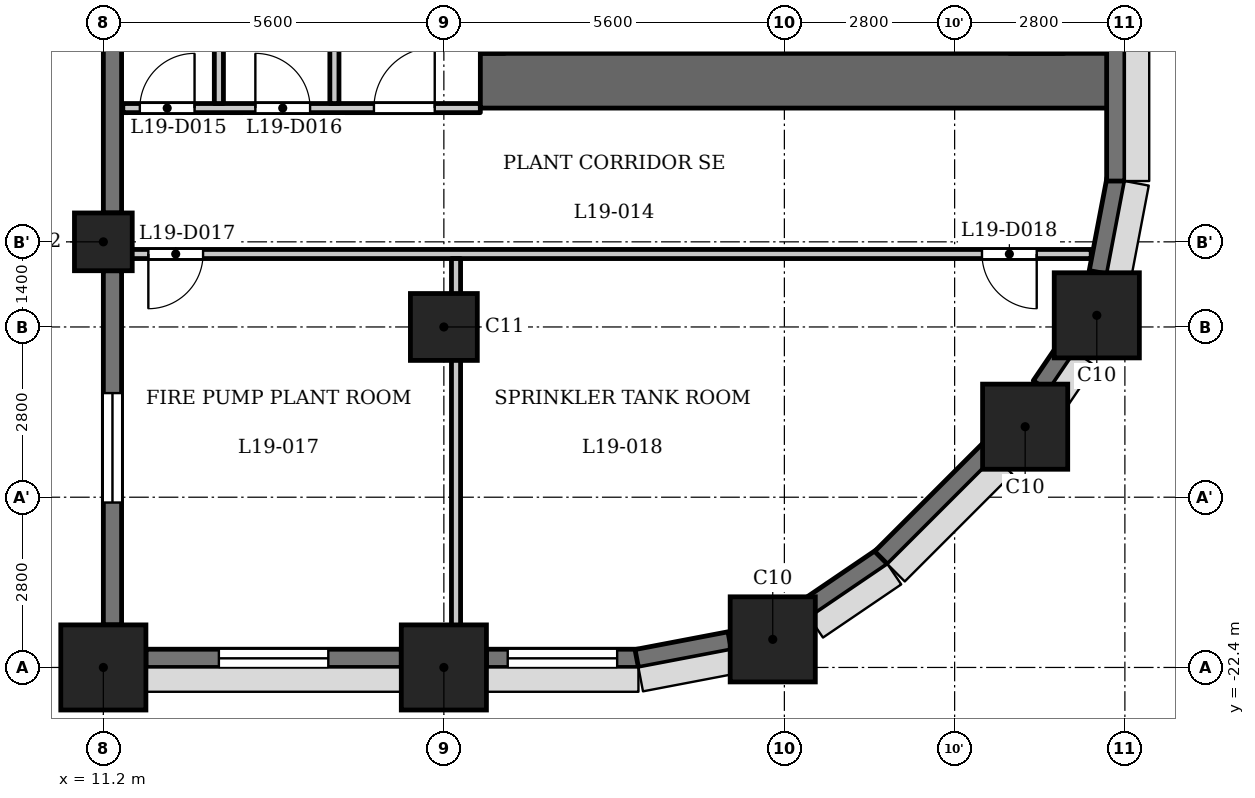
"""IFC4 building model, lengths in metres.
Left out: names, types, materials, properties, quantities, classifications, styles, units other than length and angle.
Written with IfcOpenShell. Run it as: python <this file> out.ifc"""

import sys

from ifc_helpers import new_model, si_unit, direction, frame, frame_2d, origin, origin_2d, place, context, subcontext, project, spatial, rectangle, extrude, element, fill, save


model = new_model("IFC4")
c1 = context("Model", 3, precision=1e-05, world=origin(), true_north=direction((0.0, 1.0)))
c2 = subcontext(c1, "Body", "Model", "MODEL_VIEW")
j1 = project(units=[si_unit("LENGTHUNIT", "METRE"), si_unit("PLANEANGLEUNIT", "RADIAN")], contexts=[c1])
p1 = place(None, origin())
s1 = spatial("IfcSite", under=j1, at=p1, CompositionType="ELEMENT")
p2 = place(p1, origin())
s2 = spatial("IfcBuilding", under=s1, at=p2, CompositionType="ELEMENT")
p3 = place(p2, frame((0.0, 0.0, 77.9)))
s3 = spatial("IfcBuildingStorey", under=s2, at=p3, CompositionType="ELEMENT", Elevation=77.9)
for number, where, z_axis, x_axis in (
    (1, (11.2, -22.4, 0.0), (0.0, 0.0, 1.0), (1.0, 0.0, 0.0)),
    (2, (16.8, -22.4, 0.0), (0.0, 0.0, 1.0), (1.0, 0.0, 0.0)),
    (3, (22.209, -21.938, 0.0), (0.0, 0.0, 1.0), (1.0, 0.0, 0.0)),
    (4, (26.36, -18.44, 0.0), (0.0, 0.0, 1.0), (1.0, 0.0, 0.0)),
    (5, (27.538, -16.609, 0.0), (0.0, 0.0, 1.0), (1.0, 0.0, 0.0)),
):
    element("IfcColumn", number, at=place(p3, frame(where, z_axis=z_axis, x_axis=x_axis)), inside=s3, PredefinedType="COLUMN", context=c2, shape_type="SweptSolid", body=[
        extrude(rectangle(XDim=1.4, YDim=1.4, at=origin_2d()), origin(), (0.0, 0.0, 1.0), 5.4),
    ])
p4 = place(p3, frame((16.8, -16.8, 0.0), z_axis=(0.0, 0.0, 1.0), x_axis=(1.0, 0.0, 0.0)))
e6 = element("IfcColumn", 6, at=p4, inside=s3, PredefinedType="COLUMN", context=c2, shape_type="SweptSolid", body=[
    extrude(rectangle(XDim=1.1, YDim=1.1, at=origin_2d()), origin(), (0.0, 0.0, 1.0), 5.4),
])
p5 = place(p3, frame((11.2, -15.4, 0.0), z_axis=(0.0, 0.0, 1.0), x_axis=(1.0, 0.0, 0.0)))
e7 = element("IfcColumn", 7, at=p5, inside=s3, PredefinedType="COLUMN", context=c2, shape_type="SweptSolid", body=[
    extrude(rectangle(XDim=0.95, YDim=0.95, at=origin_2d()), origin(), (0.0, 0.0, 1.0), 5.4),
])
p6 = place(p3, frame((11.35, -8.95, 0.0), z_axis=(0.0, 0.0, 1.0), x_axis=(0.0, -1.0, 0.0)))
e8 = element("IfcWall", 8, at=p6, inside=s3, PredefinedType="SOLIDWALL", context=c2, shape_type="SweptSolid", body=[
    extrude(rectangle(XDim=5.975, YDim=0.3, at=frame_2d((2.988, 0.0))), origin(), (0.0, 0.0, 1.0), 5.1),
])
p7 = place(p6, frame((1.188, 0.0, 0.9)))
e9 = element("IfcOpeningElement", 9, at=p7, cuts=e8, PredefinedType="OPENING", context=c2, shape_type="SweptSolid", body=[
    extrude(rectangle(XDim=1.8, YDim=1.5, at=frame_2d((0.9, 0.75))), frame((0.0, 0.16, 0.0), z_axis=(0.0, -1.0, 0.0), x_axis=(1.0, 0.0, 0.0)), (0.0, 0.0, 1.0), 0.32),
])
p8 = place(p3, frame((11.35, -15.875, 0.0), z_axis=(0.0, 0.0, 1.0), x_axis=(0.0, -1.0, 0.0)))
e10 = element("IfcWall", 10, at=p8, inside=s3, PredefinedType="SOLIDWALL", context=c2, shape_type="SweptSolid", body=[
    extrude(rectangle(XDim=5.825, YDim=0.3, at=frame_2d((2.913, 0.0))), origin(), (0.0, 0.0, 1.0), 5.1),
])
p9 = place(p8, frame((2.012, 0.0, 0.9)))
e11 = element("IfcOpeningElement", 11, at=p9, cuts=e10, PredefinedType="OPENING", context=c2, shape_type="SweptSolid", body=[
    extrude(rectangle(XDim=1.8, YDim=1.5, at=frame_2d((0.9, 0.75))), frame((0.0, 0.16, 0.0), z_axis=(0.0, -1.0, 0.0), x_axis=(1.0, 0.0, 0.0)), (0.0, 0.0, 1.0), 0.32),
])
p10 = place(p3, frame((11.9, -22.25, 0.0), z_axis=(0.0, 0.0, 1.0), x_axis=(1.0, 0.0, 0.0)))
e12 = element("IfcWall", 12, at=p10, inside=s3, PredefinedType="SOLIDWALL", context=c2, shape_type="SweptSolid", body=[
    extrude(rectangle(XDim=4.2, YDim=0.3, at=frame_2d((2.1, 0.0))), origin(), (0.0, 0.0, 1.0), 4.25),
])
p11 = place(p10, frame((1.2, 0.0, 0.9)))
e13 = element("IfcOpeningElement", 13, at=p11, cuts=e12, PredefinedType="OPENING", context=c2, shape_type="SweptSolid", body=[
    extrude(rectangle(XDim=1.8, YDim=1.5, at=frame_2d((0.9, 0.75))), frame((0.0, 0.16, 0.0), z_axis=(0.0, -1.0, 0.0), x_axis=(1.0, 0.0, 0.0)), (0.0, 0.0, 1.0), 0.32),
])
p12 = place(p3, frame((17.5, -22.25, 0.0), z_axis=(0.0, 0.0, 1.0), x_axis=(1.0, 0.0, 0.0)))
e14 = element("IfcWall", 14, at=p12, inside=s3, PredefinedType="SOLIDWALL", context=c2, shape_type="SweptSolid", body=[
    extrude(rectangle(XDim=2.5, YDim=0.3, at=frame_2d((1.25, 0.0))), origin(), (0.0, 0.0, 1.0), 4.25),
])
p13 = place(p12, frame((0.35, 0.0, 0.9)))
e15 = element("IfcOpeningElement", 15, at=p13, cuts=e14, PredefinedType="OPENING", context=c2, shape_type="SweptSolid", body=[
    extrude(rectangle(XDim=1.8, YDim=1.5, at=frame_2d((0.9, 0.75))), frame((0.0, 0.16, 0.0), z_axis=(0.0, -1.0, 0.0), x_axis=(1.0, 0.0, 0.0)), (0.0, 0.0, 1.0), 0.32),
])
p14 = place(p3, frame((19.972, -22.253, 0.0), z_axis=(0.0, 0.0, 1.0), x_axis=(0.982297345734, 0.187328386968, 0.0)))
e16 = element("IfcWall", 16, at=p14, inside=s3, PredefinedType="SOLIDWALL", context=c2, shape_type="SweptSolid", body=[
    extrude(rectangle(XDim=1.556, YDim=0.3, at=frame_2d((0.778, 0.0))), origin(), (0.0, 0.0, 1.0), 4.25),
])
p15 = place(p3, frame((22.726, -21.454, 0.0), z_axis=(0.0, 0.0, 1.0), x_axis=(0.827019875346, 0.562172683241, 0.0)))
e17 = element("IfcWall", 17, at=p15, inside=s3, PredefinedType="SOLIDWALL", context=c2, shape_type="SweptSolid", body=[
    extrude(rectangle(XDim=1.556, YDim=0.3, at=frame_2d((0.778, 0.0))), origin(), (0.0, 0.0, 1.0), 4.25),
])
p16 = place(p3, frame((23.991, -20.597, 0.0), z_axis=(0.0, 0.0, 1.0), x_axis=(0.707106781187, 0.707106781187, 0.0)))
e18 = element("IfcWall", 18, at=p16, inside=s3, PredefinedType="SOLIDWALL", context=c2, shape_type="SweptSolid", body=[
    extrude(rectangle(XDim=2.5, YDim=0.3, at=frame_2d((1.25, 0.0))), origin(), (0.0, 0.0, 1.0), 4.25),
])
p17 = place(p3, frame((26.617, -17.769, 0.0), z_axis=(0.0, 0.0, 1.0), x_axis=(0.562000651531, 0.827136788977, 0.0)))
e19 = element("IfcWall", 19, at=p17, inside=s3, PredefinedType="SOLIDWALL", context=c2, shape_type="SweptSolid", body=[
    extrude(rectangle(XDim=0.777, YDim=0.3, at=frame_2d((0.389, 0.0))), origin(), (0.0, 0.0, 1.0), 5.1),
])
p18 = place(p3, frame((27.561, -15.9, 0.0), z_axis=(0.0, 0.0, 1.0), x_axis=(0.187328386968, 0.982297345734, 0.0)))
e20 = element("IfcWall", 20, at=p18, inside=s3, PredefinedType="SOLIDWALL", context=c2, shape_type="SweptSolid", body=[
    extrude(rectangle(XDim=1.556, YDim=0.3, at=frame_2d((0.778, 0.0))), origin(), (0.0, 0.0, 1.0), 4.25),
])
p19 = place(p3, frame((27.85, -14.4, 0.0), z_axis=(0.0, 0.0, 1.0), x_axis=(0.0, 1.0, 0.0)))
e21 = element("IfcWall", 21, at=p19, inside=s3, PredefinedType="SOLIDWALL", context=c2, shape_type="SweptSolid", body=[
    extrude(rectangle(XDim=2.5, YDim=0.3, at=frame_2d((1.25, 0.0))), origin(), (0.0, 0.0, 1.0), 4.25),
])
p20 = place(p3, frame((17.4, -12.75, 0.0), z_axis=(0.0, 0.0, 1.0), x_axis=(1.0, 0.0, 0.0)))
e22 = element("IfcWall", 22, at=p20, inside=s3, PredefinedType="SHEAR", context=c2, shape_type="SweptSolid", body=[
    extrude(rectangle(XDim=10.4, YDim=0.9, at=frame_2d((5.2, 0.0))), origin(), (0.0, 0.0, 1.0), 5.1),
])
p21 = place(p3, frame((17.6, -12.3, 0.0), z_axis=(0.0, 0.0, 1.0), x_axis=(0.0, 1.0, 0.0)))
e23 = element("IfcWall", 23, at=p21, inside=s3, PredefinedType="SHEAR", context=c2, shape_type="SweptSolid", body=[
    extrude(rectangle(XDim=24.6, YDim=0.4, at=frame_2d((12.3, 0.0))), origin(), (0.0, 0.0, 1.0), 5.1),
])
p22 = place(p21, frame((6.0, 0.0, 0.0)))
e24 = element("IfcOpeningElement", 24, at=p22, cuts=e23, PredefinedType="OPENING", context=c2, shape_type="SweptSolid", body=[
    extrude(rectangle(XDim=1.1, YDim=2.1, at=frame_2d((0.55, 1.05))), frame((0.0, 0.21, 0.0), z_axis=(0.0, -1.0, 0.0), x_axis=(1.0, 0.0, 0.0)), (0.0, 0.0, 1.0), 0.42),
])
p23 = place(p21, frame((8.4, 0.0, 0.0)))
e25 = element("IfcOpeningElement", 25, at=p23, cuts=e23, PredefinedType="OPENING", context=c2, shape_type="SweptSolid", body=[
    extrude(rectangle(XDim=1.1, YDim=2.1, at=frame_2d((0.55, 1.05))), frame((0.0, 0.21, 0.0), z_axis=(0.0, -1.0, 0.0), x_axis=(1.0, 0.0, 0.0)), (0.0, 0.0, 1.0), 0.42),
])
p24 = place(p21, frame((10.8, 0.0, 0.0)))
e26 = element("IfcOpeningElement", 26, at=p24, cuts=e23, PredefinedType="OPENING", context=c2, shape_type="SweptSolid", body=[
    extrude(rectangle(XDim=1.1, YDim=2.1, at=frame_2d((0.55, 1.05))), frame((0.0, 0.21, 0.0), z_axis=(0.0, -1.0, 0.0), x_axis=(1.0, 0.0, 0.0)), (0.0, 0.0, 1.0), 0.42),
])
p25 = place(p21, frame((16.75, 0.0, 0.0)))
e27 = element("IfcOpeningElement", 27, at=p25, cuts=e23, PredefinedType="OPENING", context=c2, shape_type="SweptSolid", body=[
    extrude(rectangle(XDim=0.9, YDim=2.1, at=frame_2d((0.45, 1.05))), frame((0.0, 0.21, 0.0), z_axis=(0.0, -1.0, 0.0), x_axis=(1.0, 0.0, 0.0)), (0.0, 0.0, 1.0), 0.42),
])
p26 = place(p21, frame((22.8, 0.0, 0.0)))
e28 = element("IfcOpeningElement", 28, at=p26, cuts=e23, PredefinedType="OPENING", context=c2, shape_type="SweptSolid", body=[
    extrude(rectangle(XDim=1.1, YDim=2.1, at=frame_2d((0.55, 1.05))), frame((0.0, 0.21, 0.0), z_axis=(0.0, -1.0, 0.0), x_axis=(1.0, 0.0, 0.0)), (0.0, 0.0, 1.0), 0.42),
])
p27 = place(p21, frame((0.7, 0.0, 0.0)))
e29 = element("IfcOpeningElement", 29, at=p27, cuts=e23, PredefinedType="OPENING", context=c2, shape_type="SweptSolid", body=[
    extrude(rectangle(XDim=1.1, YDim=2.1, at=frame_2d((0.55, 1.05))), frame((0.0, 0.21, 0.0), z_axis=(0.0, -1.0, 0.0), x_axis=(1.0, 0.0, 0.0)), (0.0, 0.0, 1.0), 0.42),
])
p28 = place(p21, frame((12.775, 0.0, 0.0)))
e30 = element("IfcOpeningElement", 30, at=p28, cuts=e23, PredefinedType="OPENING", context=c2, shape_type="SweptSolid", body=[
    extrude(rectangle(XDim=1.8, YDim=2.1, at=frame_2d((0.9, 1.05))), frame((0.0, 0.21, 0.0), z_axis=(0.0, -1.0, 0.0), x_axis=(1.0, 0.0, 0.0)), (0.0, 0.0, 1.0), 0.42),
])
p29 = place(p3, frame((26.55, -12.3, 0.0), z_axis=(0.0, 0.0, 1.0), x_axis=(0.0, 1.0, 0.0)))
e31 = element("IfcWall", 31, at=p29, inside=s3, PredefinedType="SHEAR", context=c2, shape_type="SweptSolid", body=[
    extrude(rectangle(XDim=24.6, YDim=0.9, at=frame_2d((12.3, 0.0))), origin(), (0.0, 0.0, 1.0), 5.1),
])
p30 = place(p3, frame((23.55, -12.3, 0.0), z_axis=(0.0, 0.0, 1.0), x_axis=(0.0, 1.0, 0.0)))
e32 = element("IfcWall", 32, at=p30, inside=s3, PredefinedType="PARTITIONING", context=c2, shape_type="SweptSolid", body=[
    extrude(rectangle(XDim=2.5, YDim=0.2, at=frame_2d((1.25, 0.0))), origin(), (0.0, 0.0, 1.0), 5.1),
])
p31 = place(p30, frame((0.8, 0.0, 0.0)))
e33 = element("IfcOpeningElement", 33, at=p31, cuts=e32, PredefinedType="OPENING", context=c2, shape_type="SweptSolid", body=[
    extrude(rectangle(XDim=0.9, YDim=2.1, at=frame_2d((0.45, 1.05))), frame((0.0, 0.11, 0.0), z_axis=(0.0, -1.0, 0.0), x_axis=(1.0, 0.0, 0.0)), (0.0, 0.0, 1.0), 0.22),
])
p32 = place(p3, frame((11.29, -15.6, 0.0), z_axis=(0.0, 0.0, 1.0), x_axis=(1.0, 0.0, 0.0)))
e34 = element("IfcWall", 34, at=p32, inside=s3, PredefinedType="PARTITIONING", context=c2, shape_type="SweptSolid", body=[
    extrude(rectangle(XDim=16.156, YDim=0.15, at=frame_2d((8.078, 0.0))), origin(), (0.0, 0.0, 1.0), 5.1),
])
p33 = place(p32, frame((0.65, 0.0, 0.0)))
e35 = element("IfcOpeningElement", 35, at=p33, cuts=e34, PredefinedType="OPENING", context=c2, shape_type="SweptSolid", body=[
    extrude(rectangle(XDim=0.9, YDim=2.1, at=frame_2d((0.45, 1.05))), frame((0.0, 0.085, 0.0), z_axis=(0.0, -1.0, 0.0), x_axis=(1.0, 0.0, 0.0)), (0.0, 0.0, 1.0), 0.17),
])
p34 = place(p32, frame((14.36, 0.0, 0.0)))
e36 = element("IfcOpeningElement", 36, at=p34, cuts=e34, PredefinedType="OPENING", context=c2, shape_type="SweptSolid", body=[
    extrude(rectangle(XDim=0.9, YDim=2.1, at=frame_2d((0.45, 1.05))), frame((0.0, 0.085, 0.0), z_axis=(0.0, -1.0, 0.0), x_axis=(1.0, 0.0, 0.0)), (0.0, 0.0, 1.0), 0.17),
])
p35 = place(p3, frame((11.52, -13.2, 0.0), z_axis=(0.0, 0.0, 1.0), x_axis=(1.0, 0.0, 0.0)))
e37 = element("IfcWall", 37, at=p35, inside=s3, PredefinedType="PARTITIONING", context=c2, shape_type="SweptSolid", body=[
    extrude(rectangle(XDim=5.88, YDim=0.15, at=frame_2d((2.94, 0.0))), origin(), (0.0, 0.0, 1.0), 5.1),
])
p36 = place(p35, frame((4.13, 0.0, 0.0)))
e38 = element("IfcOpeningElement", 38, at=p36, cuts=e37, PredefinedType="OPENING", context=c2, shape_type="SweptSolid", body=[
    extrude(rectangle(XDim=1.0, YDim=2.1, at=frame_2d((0.5, 1.05))), frame((0.0, 0.085, 0.0), z_axis=(0.0, -1.0, 0.0), x_axis=(1.0, 0.0, 0.0)), (0.0, 0.0, 1.0), 0.17),
])
p37 = place(p35, frame((0.28, 0.0, 0.0)))
e39 = element("IfcOpeningElement", 39, at=p37, cuts=e37, PredefinedType="OPENING", context=c2, shape_type="SweptSolid", body=[
    extrude(rectangle(XDim=0.9, YDim=2.1, at=frame_2d((0.45, 1.05))), frame((0.0, 0.085, 0.0), z_axis=(0.0, -1.0, 0.0), x_axis=(1.0, 0.0, 0.0)), (0.0, 0.0, 1.0), 0.17),
])
p38 = place(p35, frame((2.18, 0.0, 0.0)))
e40 = element("IfcOpeningElement", 40, at=p38, cuts=e37, PredefinedType="OPENING", context=c2, shape_type="SweptSolid", body=[
    extrude(rectangle(XDim=0.9, YDim=2.1, at=frame_2d((0.45, 1.05))), frame((0.0, 0.085, 0.0), z_axis=(0.0, -1.0, 0.0), x_axis=(1.0, 0.0, 0.0)), (0.0, 0.0, 1.0), 0.17),
])
p39 = place(p3, frame((13.1, -13.125, 0.0), z_axis=(0.0, 0.0, 1.0), x_axis=(0.0, 1.0, 0.0)))
e41 = element("IfcWall", 41, at=p39, inside=s3, PredefinedType="PARTITIONING", context=c2, shape_type="SweptSolid", body=[
    extrude(rectangle(XDim=5.805, YDim=0.15, at=frame_2d((2.902, 0.0))), origin(), (0.0, 0.0, 1.0), 5.1),
])
p40 = place(p3, frame((15.0, -13.125, 0.0), z_axis=(0.0, 0.0, 1.0), x_axis=(0.0, 1.0, 0.0)))
e42 = element("IfcWall", 42, at=p40, inside=s3, PredefinedType="PARTITIONING", context=c2, shape_type="SweptSolid", body=[
    extrude(rectangle(XDim=6.356, YDim=0.15, at=frame_2d((3.178, 0.0))), origin(), (0.0, 0.0, 1.0), 5.1),
])
p41 = place(p3, frame((17.0, -22.31, 0.0), z_axis=(0.0, 0.0, 1.0), x_axis=(0.0, 1.0, 0.0)))
e43 = element("IfcWall", 43, at=p41, inside=s3, PredefinedType="PARTITIONING", context=c2, shape_type="SweptSolid", body=[
    extrude(rectangle(XDim=6.635, YDim=0.15, at=frame_2d((3.317, 0.0))), origin(), (0.0, 0.0, 1.0), 5.1),
])
p42 = place(p36, origin())
e44 = element("IfcDoor", 44, at=p42, inside=s3, OperationType="SINGLE_SWING_LEFT", PredefinedType="DOOR", context=c2, shape_type="SweptSolid", body=[
    extrude(rectangle(XDim=1.0, YDim=2.1, at=frame_2d((0.5, 1.05))), frame((0.0, 0.025, 0.0), z_axis=(0.0, -1.0, 0.0), x_axis=(1.0, 0.0, 0.0)), (0.0, 0.0, 1.0), 0.05),
])
fill(e38, e44)
p43 = place(p37, origin())
e45 = element("IfcDoor", 45, at=p43, inside=s3, OperationType="SINGLE_SWING_LEFT", PredefinedType="DOOR", context=c2, shape_type="SweptSolid", body=[
    extrude(rectangle(XDim=0.9, YDim=2.1, at=frame_2d((0.45, 1.05))), frame((0.0, 0.025, 0.0), z_axis=(0.0, -1.0, 0.0), x_axis=(1.0, 0.0, 0.0)), (0.0, 0.0, 1.0), 0.05),
])
fill(e39, e45)
p44 = place(p38, origin())
e46 = element("IfcDoor", 46, at=p44, inside=s3, OperationType="SINGLE_SWING_RIGHT", PredefinedType="DOOR", context=c2, shape_type="SweptSolid", body=[
    extrude(rectangle(XDim=0.9, YDim=2.1, at=frame_2d((0.45, 1.05))), frame((0.0, 0.025, 0.0), z_axis=(0.0, -1.0, 0.0), x_axis=(1.0, 0.0, 0.0)), (0.0, 0.0, 1.0), 0.05),
])
fill(e40, e46)
p45 = place(p33, origin())
e47 = element("IfcDoor", 47, at=p45, inside=s3, OperationType="SINGLE_SWING_LEFT", PredefinedType="DOOR", context=c2, shape_type="SweptSolid", body=[
    extrude(rectangle(XDim=0.9, YDim=2.1, at=frame_2d((0.45, 1.05))), frame((0.0, 0.025, 0.0), z_axis=(0.0, -1.0, 0.0), x_axis=(1.0, 0.0, 0.0)), (0.0, 0.0, 1.0), 0.05),
])
fill(e35, e47)
p46 = place(p34, origin())
e48 = element("IfcDoor", 48, at=p46, inside=s3, OperationType="SINGLE_SWING_RIGHT", PredefinedType="DOOR", context=c2, shape_type="SweptSolid", body=[
    extrude(rectangle(XDim=0.9, YDim=2.1, at=frame_2d((0.45, 1.05))), frame((0.0, 0.025, 0.0), z_axis=(0.0, -1.0, 0.0), x_axis=(1.0, 0.0, 0.0)), (0.0, 0.0, 1.0), 0.05),
])
fill(e36, e48)
p47 = place(p9, origin())
e49 = element("IfcWindow", 49, at=p47, inside=s3, PartitioningType="SINGLE_PANEL", PredefinedType="WINDOW", context=c2, shape_type="SweptSolid", body=[
    extrude(rectangle(XDim=1.8, YDim=1.5, at=frame_2d((0.9, 0.75))), frame((0.0, 0.03, 0.0), z_axis=(0.0, -1.0, 0.0), x_axis=(1.0, 0.0, 0.0)), (0.0, 0.0, 1.0), 0.06),
])
fill(e11, e49)
p48 = place(p11, origin())
e50 = element("IfcWindow", 50, at=p48, inside=s3, PartitioningType="SINGLE_PANEL", PredefinedType="WINDOW", context=c2, shape_type="SweptSolid", body=[
    extrude(rectangle(XDim=1.8, YDim=1.5, at=frame_2d((0.9, 0.75))), frame((0.0, 0.03, 0.0), z_axis=(0.0, -1.0, 0.0), x_axis=(1.0, 0.0, 0.0)), (0.0, 0.0, 1.0), 0.06),
])
fill(e13, e50)
p49 = place(p13, origin())
e51 = element("IfcWindow", 51, at=p49, inside=s3, PartitioningType="SINGLE_PANEL", PredefinedType="WINDOW", context=c2, shape_type="SweptSolid", body=[
    extrude(rectangle(XDim=1.8, YDim=1.5, at=frame_2d((0.9, 0.75))), frame((0.0, 0.03, 0.0), z_axis=(0.0, -1.0, 0.0), x_axis=(1.0, 0.0, 0.0)), (0.0, 0.0, 1.0), 0.06),
])
fill(e15, e51)
save(model, sys.argv[1])
